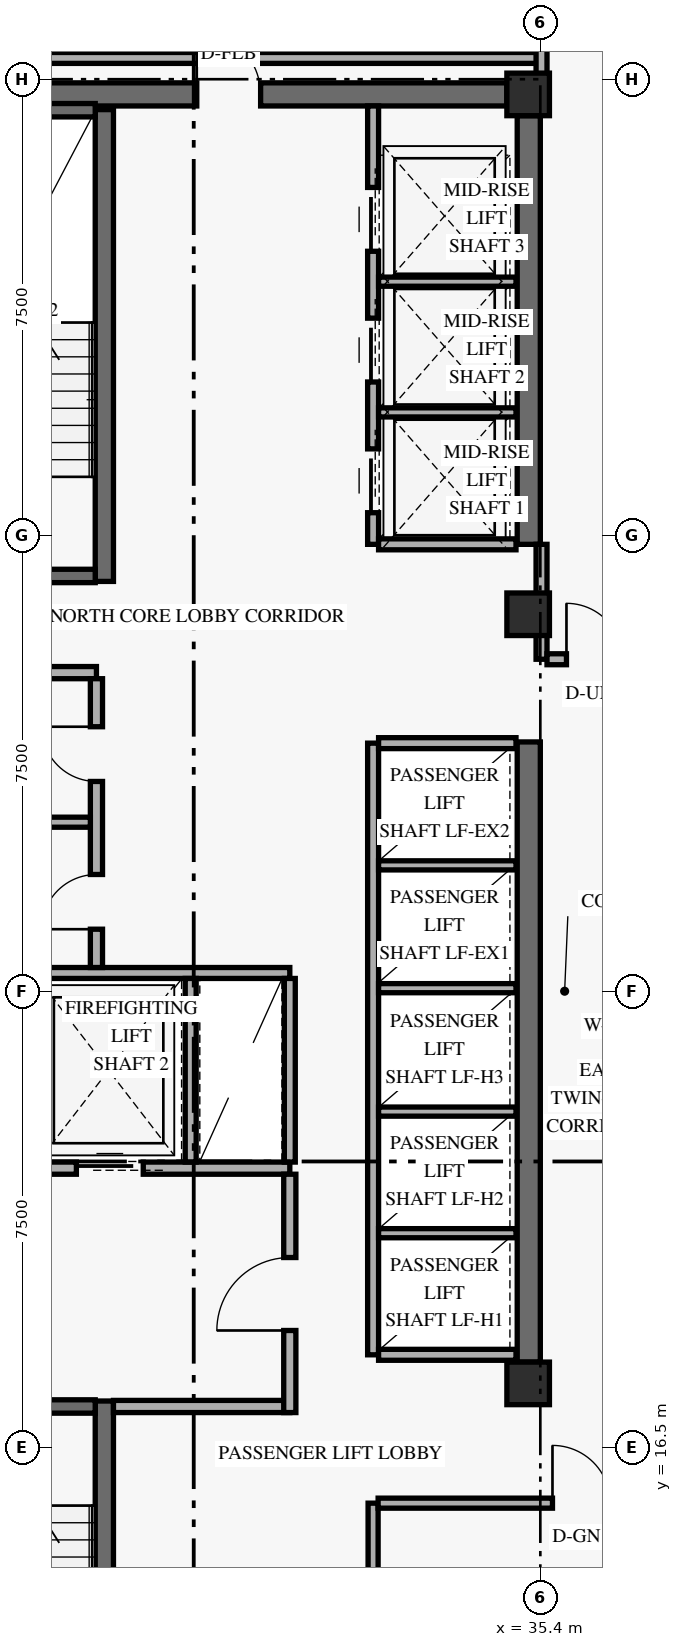
"""IFC4 building model, lengths in metres.
Left out: names, types, materials, properties, quantities, classifications, styles, units other than length and angle.
Written with IfcOpenShell. Run it as: python <this file> out.ifc"""

import sys

from ifc_helpers import new_model, si_unit, direction, frame, frame_2d, origin, origin_2d, place, context, subcontext, project, spatial, rectangle, extrude, element, fill, save


model = new_model("IFC4")
c1 = context("Model", 3, precision=1e-05, world=origin(), true_north=direction((0.0, 1.0)))
c2 = subcontext(c1, "Body", "Model", "MODEL_VIEW")
j1 = project(units=[si_unit("LENGTHUNIT", "METRE"), si_unit("PLANEANGLEUNIT", "RADIAN")], contexts=[c1])
p1 = place(None, origin())
s1 = spatial("IfcSite", under=j1, at=p1, CompositionType="ELEMENT")
p2 = place(p1, origin())
s2 = spatial("IfcBuilding", under=s1, at=p2, CompositionType="ELEMENT")
p3 = place(p2, frame((0.0, 0.0, 181.2)))
s3 = spatial("IfcBuildingStorey", under=s2, at=p3, CompositionType="ELEMENT", Elevation=181.2)
p4 = place(p3, frame((35.21, 17.9, 0.0), z_axis=(0.0, 0.0, 1.0), x_axis=(0.0, 1.0, 0.0)))
e1 = element("IfcWall", 1, at=p4, inside=s3, PredefinedType="SHEAR", context=c2, shape_type="SweptSolid", body=[
    extrude(rectangle(XDim=10.2, YDim=0.38, at=frame_2d((5.1, 0.0))), origin(), (0.0, 0.0, 1.0), 2.748),
])
p5 = place(p3, frame((35.21, 31.35, 0.0), z_axis=(0.0, 0.0, 1.0), x_axis=(0.0, 1.0, 0.0)))
e2 = element("IfcWall", 2, at=p5, inside=s3, PredefinedType="SHEAR", context=c2, shape_type="SweptSolid", body=[
    extrude(rectangle(XDim=7.05, YDim=0.38, at=frame_2d((3.525, 0.0))), origin(), (0.0, 0.0, 1.0), 2.748),
])
p6 = place(p3, frame((24.55, 38.75, 0.0), z_axis=(0.0, 0.0, 1.0), x_axis=(1.0, 0.0, 0.0)))
e3 = element("IfcWall", 3, at=p6, inside=s3, PredefinedType="SHEAR", context=c2, shape_type="SweptSolid", body=[
    extrude(rectangle(XDim=10.3, YDim=0.38, at=frame_2d((5.15, 0.0))), origin(), (0.0, 0.0, 1.0), 3.36),
])
p7 = place(p6, frame((5.2, 0.0, 0.0)))
e4 = element("IfcOpeningElement", 4, at=p7, cuts=e3, PredefinedType="OPENING", context=c2, shape_type="SweptSolid", body=[
    extrude(rectangle(XDim=1.05, YDim=2.15, at=frame_2d((0.525, 1.075))), frame((0.0, 0.2, 0.0), z_axis=(0.0, -1.0, 0.0), x_axis=(1.0, 0.0, 0.0)), (0.0, 0.0, 1.0), 0.4),
])
p8 = place(p3, frame((28.23, 9.5, 0.0), z_axis=(0.0, 0.0, 1.0), x_axis=(0.0, 1.0, 0.0)))
e5 = element("IfcWall", 5, at=p8, inside=s3, PredefinedType="SHEAR", context=c2, shape_type="SweptSolid", body=[
    extrude(rectangle(XDim=7.76, YDim=0.3, at=frame_2d((3.88, 0.0))), origin(), (0.0, 0.0, 1.0), 3.36),
])
p9 = place(p3, frame((24.92, 17.17, 0.0), z_axis=(0.0, 0.0, 1.0), x_axis=(1.0, 0.0, 0.0)))
e6 = element("IfcWall", 6, at=p9, inside=s3, PredefinedType="SHEAR", context=c2, shape_type="SweptSolid", body=[
    extrude(rectangle(XDim=3.16, YDim=0.22, at=frame_2d((1.58, 0.0))), origin(), (0.0, 0.0, 1.0), 3.36),
])
p10 = place(p9, frame((0.78, 0.0, 0.0)))
e7 = element("IfcOpeningElement", 7, at=p10, cuts=e6, PredefinedType="OPENING", context=c2, shape_type="SweptSolid", body=[
    extrude(rectangle(XDim=1.05, YDim=2.15, at=frame_2d((0.525, 1.075))), frame((0.0, 0.12, 0.0), z_axis=(0.0, -1.0, 0.0), x_axis=(1.0, 0.0, 0.0)), (0.0, 0.0, 1.0), 0.24),
])
p11 = place(p3, frame((28.23, 30.74, 0.0), z_axis=(0.0, 0.0, 1.0), x_axis=(0.0, 1.0, 0.0)))
e8 = element("IfcWall", 8, at=p11, inside=s3, PredefinedType="SHEAR", context=c2, shape_type="SweptSolid", body=[
    extrude(rectangle(XDim=7.76, YDim=0.3, at=frame_2d((3.88, 0.0))), origin(), (0.0, 0.0, 1.0), 3.36),
])
p12 = place(p3, frame((24.92, 30.83, 0.0), z_axis=(0.0, 0.0, 1.0), x_axis=(1.0, 0.0, 0.0)))
e9 = element("IfcWall", 9, at=p12, inside=s3, PredefinedType="SHEAR", context=c2, shape_type="SweptSolid", body=[
    extrude(rectangle(XDim=3.16, YDim=0.22, at=frame_2d((1.58, 0.0))), origin(), (0.0, 0.0, 1.0), 3.36),
])
p13 = place(p12, frame((0.78, 0.0, 0.0)))
e10 = element("IfcOpeningElement", 10, at=p13, cuts=e9, PredefinedType="OPENING", context=c2, shape_type="SweptSolid", body=[
    extrude(rectangle(XDim=1.05, YDim=2.15, at=frame_2d((0.525, 1.075))), frame((0.0, 0.12, 0.0), z_axis=(0.0, -1.0, 0.0), x_axis=(1.0, 0.0, 0.0)), (0.0, 0.0, 1.0), 0.24),
])
p14 = place(p3, frame((24.92, 38.49, 0.0), z_axis=(0.0, 0.0, 1.0), x_axis=(1.0, 0.0, 0.0)))
e11 = element("IfcWall", 11, at=p14, inside=s3, PredefinedType="SHEAR", context=c2, shape_type="SweptSolid", body=[
    extrude(rectangle(XDim=3.16, YDim=0.22, at=frame_2d((1.58, 0.0))), origin(), (0.0, 0.0, 1.0), 3.36),
])
for number, where, z_axis, x_axis in (
    (12, (35.2, 17.55, 0.0), (0.0, 0.0, 1.0), (1.0, 0.0, 0.0)),
    (13, (35.2, 30.2, 0.0), (0.0, 0.0, 1.0), (1.0, 0.0, 0.0)),
    (14, (35.2, 38.75, 0.0), (0.0, 0.0, 1.0), (1.0, 0.0, 0.0)),
):
    element("IfcColumn", number, at=place(p3, frame(where, z_axis=z_axis, x_axis=x_axis)), inside=s3, PredefinedType="COLUMN", context=c2, shape_type="SweptSolid", body=[
        extrude(rectangle(XDim=0.7, YDim=0.7, at=origin_2d()), origin(), (0.0, 0.0, 1.0), 3.6),
    ])
p15 = place(p3, frame((24.45, 21.09, 0.0), z_axis=(0.0, 0.0, 1.0), x_axis=(1.0, 0.0, 0.0)))
e15 = element("IfcWall", 15, at=p15, inside=s3, PredefinedType="STANDARD", context=c2, shape_type="SweptSolid", body=[
    extrude(rectangle(XDim=6.83, YDim=0.2, at=frame_2d((3.415, 0.0))), origin(), (0.0, 0.0, 1.0), 3.36),
])
p16 = place(p15, frame((0.72, 0.0, 0.0)))
e16 = element("IfcOpeningElement", 16, at=p16, cuts=e15, PredefinedType="OPENING", context=c2, shape_type="SweptSolid", body=[
    extrude(rectangle(XDim=1.1, YDim=2.2, at=frame_2d((0.55, 1.1))), frame((0.0, 0.11, 0.0), z_axis=(0.0, -1.0, 0.0), x_axis=(1.0, 0.0, 0.0)), (0.0, 0.0, 1.0), 0.22),
])
p17 = place(p15, frame((3.32, 0.0, 0.0)))
e17 = element("IfcOpeningElement", 17, at=p17, cuts=e15, PredefinedType="OPENING", context=c2, shape_type="SweptSolid", body=[
    extrude(rectangle(XDim=1.1, YDim=2.2, at=frame_2d((0.55, 1.1))), frame((0.0, 0.11, 0.0), z_axis=(0.0, -1.0, 0.0), x_axis=(1.0, 0.0, 0.0)), (0.0, 0.0, 1.0), 0.22),
])
p18 = place(p3, frame((28.38, 17.17, 0.0), z_axis=(0.0, 0.0, 1.0), x_axis=(1.0, 0.0, 0.0)))
e18 = element("IfcWall", 18, at=p18, inside=s3, PredefinedType="STANDARD", context=c2, shape_type="SweptSolid", body=[
    extrude(rectangle(XDim=2.9, YDim=0.2, at=frame_2d((1.45, 0.0))), origin(), (0.0, 0.0, 1.0), 3.36),
])
p19 = place(p3, frame((31.28, 17.07, 0.0), z_axis=(0.0, 0.0, 1.0), x_axis=(0.0, 1.0, 0.0)))
e19 = element("IfcWall", 19, at=p19, inside=s3, PredefinedType="STANDARD", context=c2, shape_type="SweptSolid", body=[
    extrude(rectangle(XDim=3.92, YDim=0.2, at=frame_2d((1.96, 0.0))), origin(), (0.0, 0.0, 1.0), 2.73),
])
p20 = place(p19, frame((1.35, 0.0, 0.0)))
e20 = element("IfcOpeningElement", 20, at=p20, cuts=e19, PredefinedType="OPENING", context=c2, shape_type="SweptSolid", body=[
    extrude(rectangle(XDim=1.2, YDim=2.15, at=frame_2d((0.6, 1.075))), frame((0.0, 0.11, 0.0), z_axis=(0.0, -1.0, 0.0), x_axis=(1.0, 0.0, 0.0)), (0.0, 0.0, 1.0), 0.22),
])
p21 = place(p3, frame((24.45, 24.3, 0.0), z_axis=(0.0, 0.0, 1.0), x_axis=(1.0, 0.0, 0.0)))
e21 = element("IfcWall", 21, at=p21, inside=s3, PredefinedType="STANDARD", context=c2, shape_type="SweptSolid", body=[
    extrude(rectangle(XDim=6.83, YDim=0.18, at=frame_2d((3.415, 0.0))), origin(), (0.0, 0.0, 1.0), 3.36),
])
for number, where, z_axis, x_axis in (
    (22, (29.65, 21.19, 0.0), (0.0, 0.0, 1.0), (0.0, 1.0, 0.0)),
    (23, (31.28, 21.19, 0.0), (0.0, 0.0, 1.0), (0.0, 1.0, 0.0)),
):
    element("IfcWall", number, at=place(p3, frame(where, z_axis=z_axis, x_axis=x_axis)), inside=s3, PredefinedType="STANDARD", context=c2, shape_type="SweptSolid", body=[
        extrude(rectangle(XDim=3.02, YDim=0.18, at=frame_2d((1.51, 0.0))), origin(), (0.0, 0.0, 1.0), 3.36),
    ])
p22 = place(p3, frame((24.45, 29.24, 0.0), z_axis=(0.0, 0.0, 1.0), x_axis=(1.0, 0.0, 0.0)))
e24 = element("IfcWall", 24, at=p22, inside=s3, PredefinedType="STANDARD", context=c2, shape_type="SweptSolid", body=[
    extrude(rectangle(XDim=3.65, YDim=0.2, at=frame_2d((1.825, 0.0))), origin(), (0.0, 0.0, 1.0), 3.36),
])
p23 = place(p3, frame((28.1, 24.39, 0.0), z_axis=(0.0, 0.0, 1.0), x_axis=(0.0, 1.0, 0.0)))
e25 = element("IfcWall", 25, at=p23, inside=s3, PredefinedType="STANDARD", context=c2, shape_type="SweptSolid", body=[
    extrude(rectangle(XDim=4.75, YDim=0.2, at=frame_2d((2.375, 0.0))), origin(), (0.0, 0.0, 1.0), 3.36),
])
p24 = place(p23, frame((0.63, 0.0, 0.0)))
e26 = element("IfcOpeningElement", 26, at=p24, cuts=e25, PredefinedType="OPENING", context=c2, shape_type="SweptSolid", body=[
    extrude(rectangle(XDim=0.9, YDim=2.1, at=frame_2d((0.45, 1.05))), frame((0.0, 0.11, 0.0), z_axis=(0.0, -1.0, 0.0), x_axis=(1.0, 0.0, 0.0)), (0.0, 0.0, 1.0), 0.22),
])
p25 = place(p23, frame((3.06, 0.0, 0.0)))
e27 = element("IfcOpeningElement", 27, at=p25, cuts=e25, PredefinedType="OPENING", context=c2, shape_type="SweptSolid", body=[
    extrude(rectangle(XDim=0.9, YDim=2.1, at=frame_2d((0.45, 1.05))), frame((0.0, 0.11, 0.0), z_axis=(0.0, -1.0, 0.0), x_axis=(1.0, 0.0, 0.0)), (0.0, 0.0, 1.0), 0.22),
])
p26 = place(p3, frame((24.45, 26.78, 0.0), z_axis=(0.0, 0.0, 1.0), x_axis=(1.0, 0.0, 0.0)))
e28 = element("IfcWall", 28, at=p26, inside=s3, PredefinedType="PARTITIONING", context=c2, shape_type="SweptSolid", body=[
    extrude(rectangle(XDim=3.55, YDim=0.165, at=frame_2d((1.775, 0.0))), origin(), (0.0, 0.0, 1.0), 3.36),
])
p27 = place(p3, frame((32.65, 18.02, 0.0), z_axis=(0.0, 0.0, 1.0), x_axis=(0.0, 1.0, 0.0)))
e29 = element("IfcWall", 29, at=p27, inside=s3, PredefinedType="STANDARD", context=c2, shape_type="SweptSolid", body=[
    extrude(rectangle(XDim=10.06, YDim=0.18, at=frame_2d((5.03, 0.0))), origin(), (0.0, 0.0, 1.0), 3.36),
])
for number, where, z_axis, x_axis in (
    (30, (32.74, 18.02, 0.0), (0.0, 0.0, 1.0), (1.0, 0.0, 0.0)),
    (31, (32.74, 28.08, 0.0), (0.0, 0.0, 1.0), (1.0, 0.0, 0.0)),
):
    element("IfcWall", number, at=place(p3, frame(where, z_axis=z_axis, x_axis=x_axis)), inside=s3, PredefinedType="STANDARD", context=c2, shape_type="SweptSolid", body=[
        extrude(rectangle(XDim=2.26, YDim=0.18, at=frame_2d((1.13, 0.0))), origin(), (0.0, 0.0, 1.0), 3.36),
    ])
for number, where, z_axis, x_axis in (
    (32, (32.74, 20.02, 0.0), (0.0, 0.0, 1.0), (1.0, 0.0, 0.0)),
    (33, (32.74, 22.02, 0.0), (0.0, 0.0, 1.0), (1.0, 0.0, 0.0)),
    (34, (32.74, 24.05, 0.0), (0.0, 0.0, 1.0), (1.0, 0.0, 0.0)),
    (35, (32.74, 26.07, 0.0), (0.0, 0.0, 1.0), (1.0, 0.0, 0.0)),
):
    element("IfcWall", number, at=place(p3, frame(where, z_axis=z_axis, x_axis=x_axis)), inside=s3, PredefinedType="STANDARD", context=c2, shape_type="SweptSolid", body=[
        extrude(rectangle(XDim=2.26, YDim=0.15, at=frame_2d((1.13, 0.0))), origin(), (0.0, 0.0, 1.0), 3.36),
    ])
p28 = place(p3, frame((32.65, 31.35, 0.0), z_axis=(0.0, 0.0, 1.0), x_axis=(0.0, 1.0, 0.0)))
e36 = element("IfcWall", 36, at=p28, inside=s3, PredefinedType="STANDARD", context=c2, shape_type="SweptSolid", body=[
    extrude(rectangle(XDim=7.21, YDim=0.18, at=frame_2d((3.605, 0.0))), origin(), (0.0, 0.0, 1.0), 3.36),
])
p29 = place(p28, frame((0.52, 0.0, 0.0)))
e37 = element("IfcOpeningElement", 37, at=p29, cuts=e36, PredefinedType="OPENING", context=c2, shape_type="SweptSolid", body=[
    extrude(rectangle(XDim=1.05, YDim=2.2, at=frame_2d((0.525, 1.1))), frame((0.0, 0.1, 0.0), z_axis=(0.0, -1.0, 0.0), x_axis=(1.0, 0.0, 0.0)), (0.0, 0.0, 1.0), 0.2),
])
p30 = place(p28, frame((2.67, 0.0, 0.0)))
e38 = element("IfcOpeningElement", 38, at=p30, cuts=e36, PredefinedType="OPENING", context=c2, shape_type="SweptSolid", body=[
    extrude(rectangle(XDim=1.05, YDim=2.2, at=frame_2d((0.525, 1.1))), frame((0.0, 0.1, 0.0), z_axis=(0.0, -1.0, 0.0), x_axis=(1.0, 0.0, 0.0)), (0.0, 0.0, 1.0), 0.2),
])
p31 = place(p28, frame((4.82, 0.0, 0.0)))
e39 = element("IfcOpeningElement", 39, at=p31, cuts=e36, PredefinedType="OPENING", context=c2, shape_type="SweptSolid", body=[
    extrude(rectangle(XDim=1.05, YDim=2.2, at=frame_2d((0.525, 1.1))), frame((0.0, 0.1, 0.0), z_axis=(0.0, -1.0, 0.0), x_axis=(1.0, 0.0, 0.0)), (0.0, 0.0, 1.0), 0.2),
])
p32 = place(p3, frame((32.74, 31.35, 0.0), z_axis=(0.0, 0.0, 1.0), x_axis=(1.0, 0.0, 0.0)))
e40 = element("IfcWall", 40, at=p32, inside=s3, PredefinedType="STANDARD", context=c2, shape_type="SweptSolid", body=[
    extrude(rectangle(XDim=2.26, YDim=0.18, at=frame_2d((1.13, 0.0))), origin(), (0.0, 0.0, 1.0), 3.36),
])
for number, where, z_axis, x_axis in (
    (41, (32.74, 33.52, 0.0), (0.0, 0.0, 1.0), (1.0, 0.0, 0.0)),
    (42, (32.74, 35.67, 0.0), (0.0, 0.0, 1.0), (1.0, 0.0, 0.0)),
):
    element("IfcWall", number, at=place(p3, frame(where, z_axis=z_axis, x_axis=x_axis)), inside=s3, PredefinedType="STANDARD", context=c2, shape_type="SweptSolid", body=[
        extrude(rectangle(XDim=2.26, YDim=0.15, at=frame_2d((1.13, 0.0))), origin(), (0.0, 0.0, 1.0), 3.36),
    ])
p33 = place(p3, frame((32.65, 9.5, 0.0), z_axis=(0.0, 0.0, 1.0), x_axis=(0.0, 1.0, 0.0)))
e43 = element("IfcWall", 43, at=p33, inside=s3, PredefinedType="PARTITIONING", context=c2, shape_type="SweptSolid", body=[
    extrude(rectangle(XDim=6.08, YDim=0.165, at=frame_2d((3.04, 0.0))), origin(), (0.0, 0.0, 1.0), 3.36),
])
p34 = place(p3, frame((32.732, 15.58, 0.0), z_axis=(0.0, 0.0, 1.0), x_axis=(1.0, 0.0, 0.0)))
e44 = element("IfcWall", 44, at=p34, inside=s3, PredefinedType="PARTITIONING", context=c2, shape_type="SweptSolid", body=[
    extrude(rectangle(XDim=4.818, YDim=0.165, at=frame_2d((2.409, 0.0))), origin(), (0.0, 0.0, 1.0), 2.73),
])
p35 = place(p34, frame((2.867, 0.0, 0.0)))
e45 = element("IfcOpeningElement", 45, at=p35, cuts=e44, PredefinedType="OPENING", context=c2, shape_type="SweptSolid", body=[
    extrude(rectangle(XDim=0.95, YDim=2.15, at=frame_2d((0.475, 1.075))), frame((0.0, 0.093, 0.0), z_axis=(0.0, -1.0, 0.0), x_axis=(1.0, 0.0, 0.0)), (0.0, 0.0, 1.0), 0.185),
])
p36 = place(p3, frame((35.42, 29.46, 0.0), z_axis=(0.0, 0.0, 1.0), x_axis=(0.0, 1.0, 0.0)))
e46 = element("IfcWall", 46, at=p36, inside=s3, PredefinedType="STANDARD", context=c2, shape_type="SweptSolid", body=[
    extrude(rectangle(XDim=1.89, YDim=0.18, at=frame_2d((0.945, 0.0))), origin(), (0.0, 0.0, 1.0), 2.73),
])
p37 = place(p3, frame((35.51, 29.46, 0.0), z_axis=(0.0, 0.0, 1.0), x_axis=(1.0, 0.0, 0.0)))
e47 = element("IfcWall", 47, at=p37, inside=s3, PredefinedType="STANDARD", context=c2, shape_type="SweptSolid", body=[
    extrude(rectangle(XDim=12.29, YDim=0.18, at=frame_2d((6.145, 0.0))), origin(), (0.0, 0.0, 1.0), 2.73),
])
p38 = place(p37, frame((0.32, 0.0, 0.0)))
e48 = element("IfcOpeningElement", 48, at=p38, cuts=e47, PredefinedType="OPENING", context=c2, shape_type="SweptSolid", body=[
    extrude(rectangle(XDim=0.92, YDim=2.15, at=frame_2d((0.46, 1.075))), frame((0.0, 0.1, 0.0), z_axis=(0.0, -1.0, 0.0), x_axis=(1.0, 0.0, 0.0)), (0.0, 0.0, 1.0), 0.2),
])
p39 = place(p3, frame((23.85, 39.35, 0.0), z_axis=(0.0, 0.0, 1.0), x_axis=(1.0, 0.0, 0.0)))
e49 = element("IfcWall", 49, at=p39, inside=s3, PredefinedType="STANDARD", context=c2, shape_type="SweptSolid", body=[
    extrude(rectangle(XDim=11.57, YDim=0.18, at=frame_2d((5.785, 0.0))), origin(), (0.0, 0.0, 1.0), 2.73),
])
p40 = place(p3, frame((35.42, 38.75, 0.0), z_axis=(0.0, 0.0, 1.0), x_axis=(0.0, 1.0, 0.0)))
e50 = element("IfcWall", 50, at=p40, inside=s3, PredefinedType="PARTITIONING", context=c2, shape_type="SweptSolid", body=[
    extrude(rectangle(XDim=4.97, YDim=0.18, at=frame_2d((2.485, 0.0))), origin(), (0.0, 0.0, 1.0), 2.73),
])
p41 = place(p17, origin())
e51 = element("IfcDoor", 51, at=p41, inside=s3, OperationType="SLIDING_TO_LEFT", PredefinedType="DOOR", context=c2, shape_type="SweptSolid", body=[
    extrude(rectangle(XDim=1.1, YDim=2.2, at=frame_2d((0.55, 1.1))), frame((0.0, 0.025, 0.0), z_axis=(0.0, -1.0, 0.0), x_axis=(1.0, 0.0, 0.0)), (0.0, 0.0, 1.0), 0.05),
])
fill(e17, e51)
p42 = place(p20, origin())
e52 = element("IfcDoor", 52, at=p42, inside=s3, OperationType="SINGLE_SWING_LEFT", PredefinedType="DOOR", context=c2, shape_type="SweptSolid", body=[
    extrude(rectangle(XDim=1.2, YDim=2.15, at=frame_2d((0.6, 1.075))), frame((0.0, 0.025, 0.0), z_axis=(0.0, -1.0, 0.0), x_axis=(1.0, 0.0, 0.0)), (0.0, 0.0, 1.0), 0.05),
])
fill(e20, e52)
p43 = place(p24, origin())
e53 = element("IfcDoor", 53, at=p43, inside=s3, OperationType="SINGLE_SWING_LEFT", PredefinedType="DOOR", context=c2, shape_type="SweptSolid", body=[
    extrude(rectangle(XDim=0.9, YDim=2.1, at=frame_2d((0.45, 1.05))), frame((0.0, 0.025, 0.0), z_axis=(0.0, -1.0, 0.0), x_axis=(1.0, 0.0, 0.0)), (0.0, 0.0, 1.0), 0.05),
])
fill(e26, e53)
p44 = place(p25, origin())
e54 = element("IfcDoor", 54, at=p44, inside=s3, OperationType="SINGLE_SWING_RIGHT", PredefinedType="DOOR", context=c2, shape_type="SweptSolid", body=[
    extrude(rectangle(XDim=0.9, YDim=2.1, at=frame_2d((0.45, 1.05))), frame((0.0, 0.025, 0.0), z_axis=(0.0, -1.0, 0.0), x_axis=(1.0, 0.0, 0.0)), (0.0, 0.0, 1.0), 0.05),
])
fill(e27, e54)
p45 = place(p29, origin())
e55 = element("IfcDoor", 55, at=p45, inside=s3, OperationType="SLIDING_TO_LEFT", PredefinedType="DOOR", context=c2, shape_type="SweptSolid", body=[
    extrude(rectangle(XDim=1.05, YDim=2.2, at=frame_2d((0.525, 1.1))), frame((0.0, 0.025, 0.0), z_axis=(0.0, -1.0, 0.0), x_axis=(1.0, 0.0, 0.0)), (0.0, 0.0, 1.0), 0.05),
])
fill(e37, e55)
p46 = place(p30, origin())
e56 = element("IfcDoor", 56, at=p46, inside=s3, OperationType="SLIDING_TO_LEFT", PredefinedType="DOOR", context=c2, shape_type="SweptSolid", body=[
    extrude(rectangle(XDim=1.05, YDim=2.2, at=frame_2d((0.525, 1.1))), frame((0.0, 0.025, 0.0), z_axis=(0.0, -1.0, 0.0), x_axis=(1.0, 0.0, 0.0)), (0.0, 0.0, 1.0), 0.05),
])
fill(e38, e56)
p47 = place(p31, origin())
e57 = element("IfcDoor", 57, at=p47, inside=s3, OperationType="SLIDING_TO_LEFT", PredefinedType="DOOR", context=c2, shape_type="SweptSolid", body=[
    extrude(rectangle(XDim=1.05, YDim=2.2, at=frame_2d((0.525, 1.1))), frame((0.0, 0.025, 0.0), z_axis=(0.0, -1.0, 0.0), x_axis=(1.0, 0.0, 0.0)), (0.0, 0.0, 1.0), 0.05),
])
fill(e39, e57)
p48 = place(p35, origin())
e58 = element("IfcDoor", 58, at=p48, inside=s3, OperationType="SINGLE_SWING_LEFT", PredefinedType="DOOR", context=c2, shape_type="SweptSolid", body=[
    extrude(rectangle(XDim=0.95, YDim=2.15, at=frame_2d((0.475, 1.075))), frame((0.0, 0.025, 0.0), z_axis=(0.0, -1.0, 0.0), x_axis=(1.0, 0.0, 0.0)), (0.0, 0.0, 1.0), 0.05),
])
fill(e45, e58)
p49 = place(p7, frame((1.05, 0.0, 0.0), z_axis=(0.0, 0.0, 1.0), x_axis=(-1.0, 0.0, 0.0)))
e59 = element("IfcDoor", 59, at=p49, inside=s3, OperationType="SINGLE_SWING_RIGHT", PredefinedType="DOOR", context=c2, shape_type="SweptSolid", body=[
    extrude(rectangle(XDim=1.05, YDim=2.15, at=frame_2d((0.525, 1.075))), frame((0.0, 0.025, 0.0), z_axis=(0.0, -1.0, 0.0), x_axis=(1.0, 0.0, 0.0)), (0.0, 0.0, 1.0), 0.05),
])
fill(e4, e59)
p50 = place(p38, origin())
e60 = element("IfcDoor", 60, at=p50, inside=s3, OperationType="SINGLE_SWING_LEFT", PredefinedType="DOOR", context=c2, shape_type="SweptSolid", body=[
    extrude(rectangle(XDim=0.92, YDim=2.15, at=frame_2d((0.46, 1.075))), frame((0.0, 0.025, 0.0), z_axis=(0.0, -1.0, 0.0), x_axis=(1.0, 0.0, 0.0)), (0.0, 0.0, 1.0), 0.05),
])
fill(e48, e60)
save(model, sys.argv[1])
